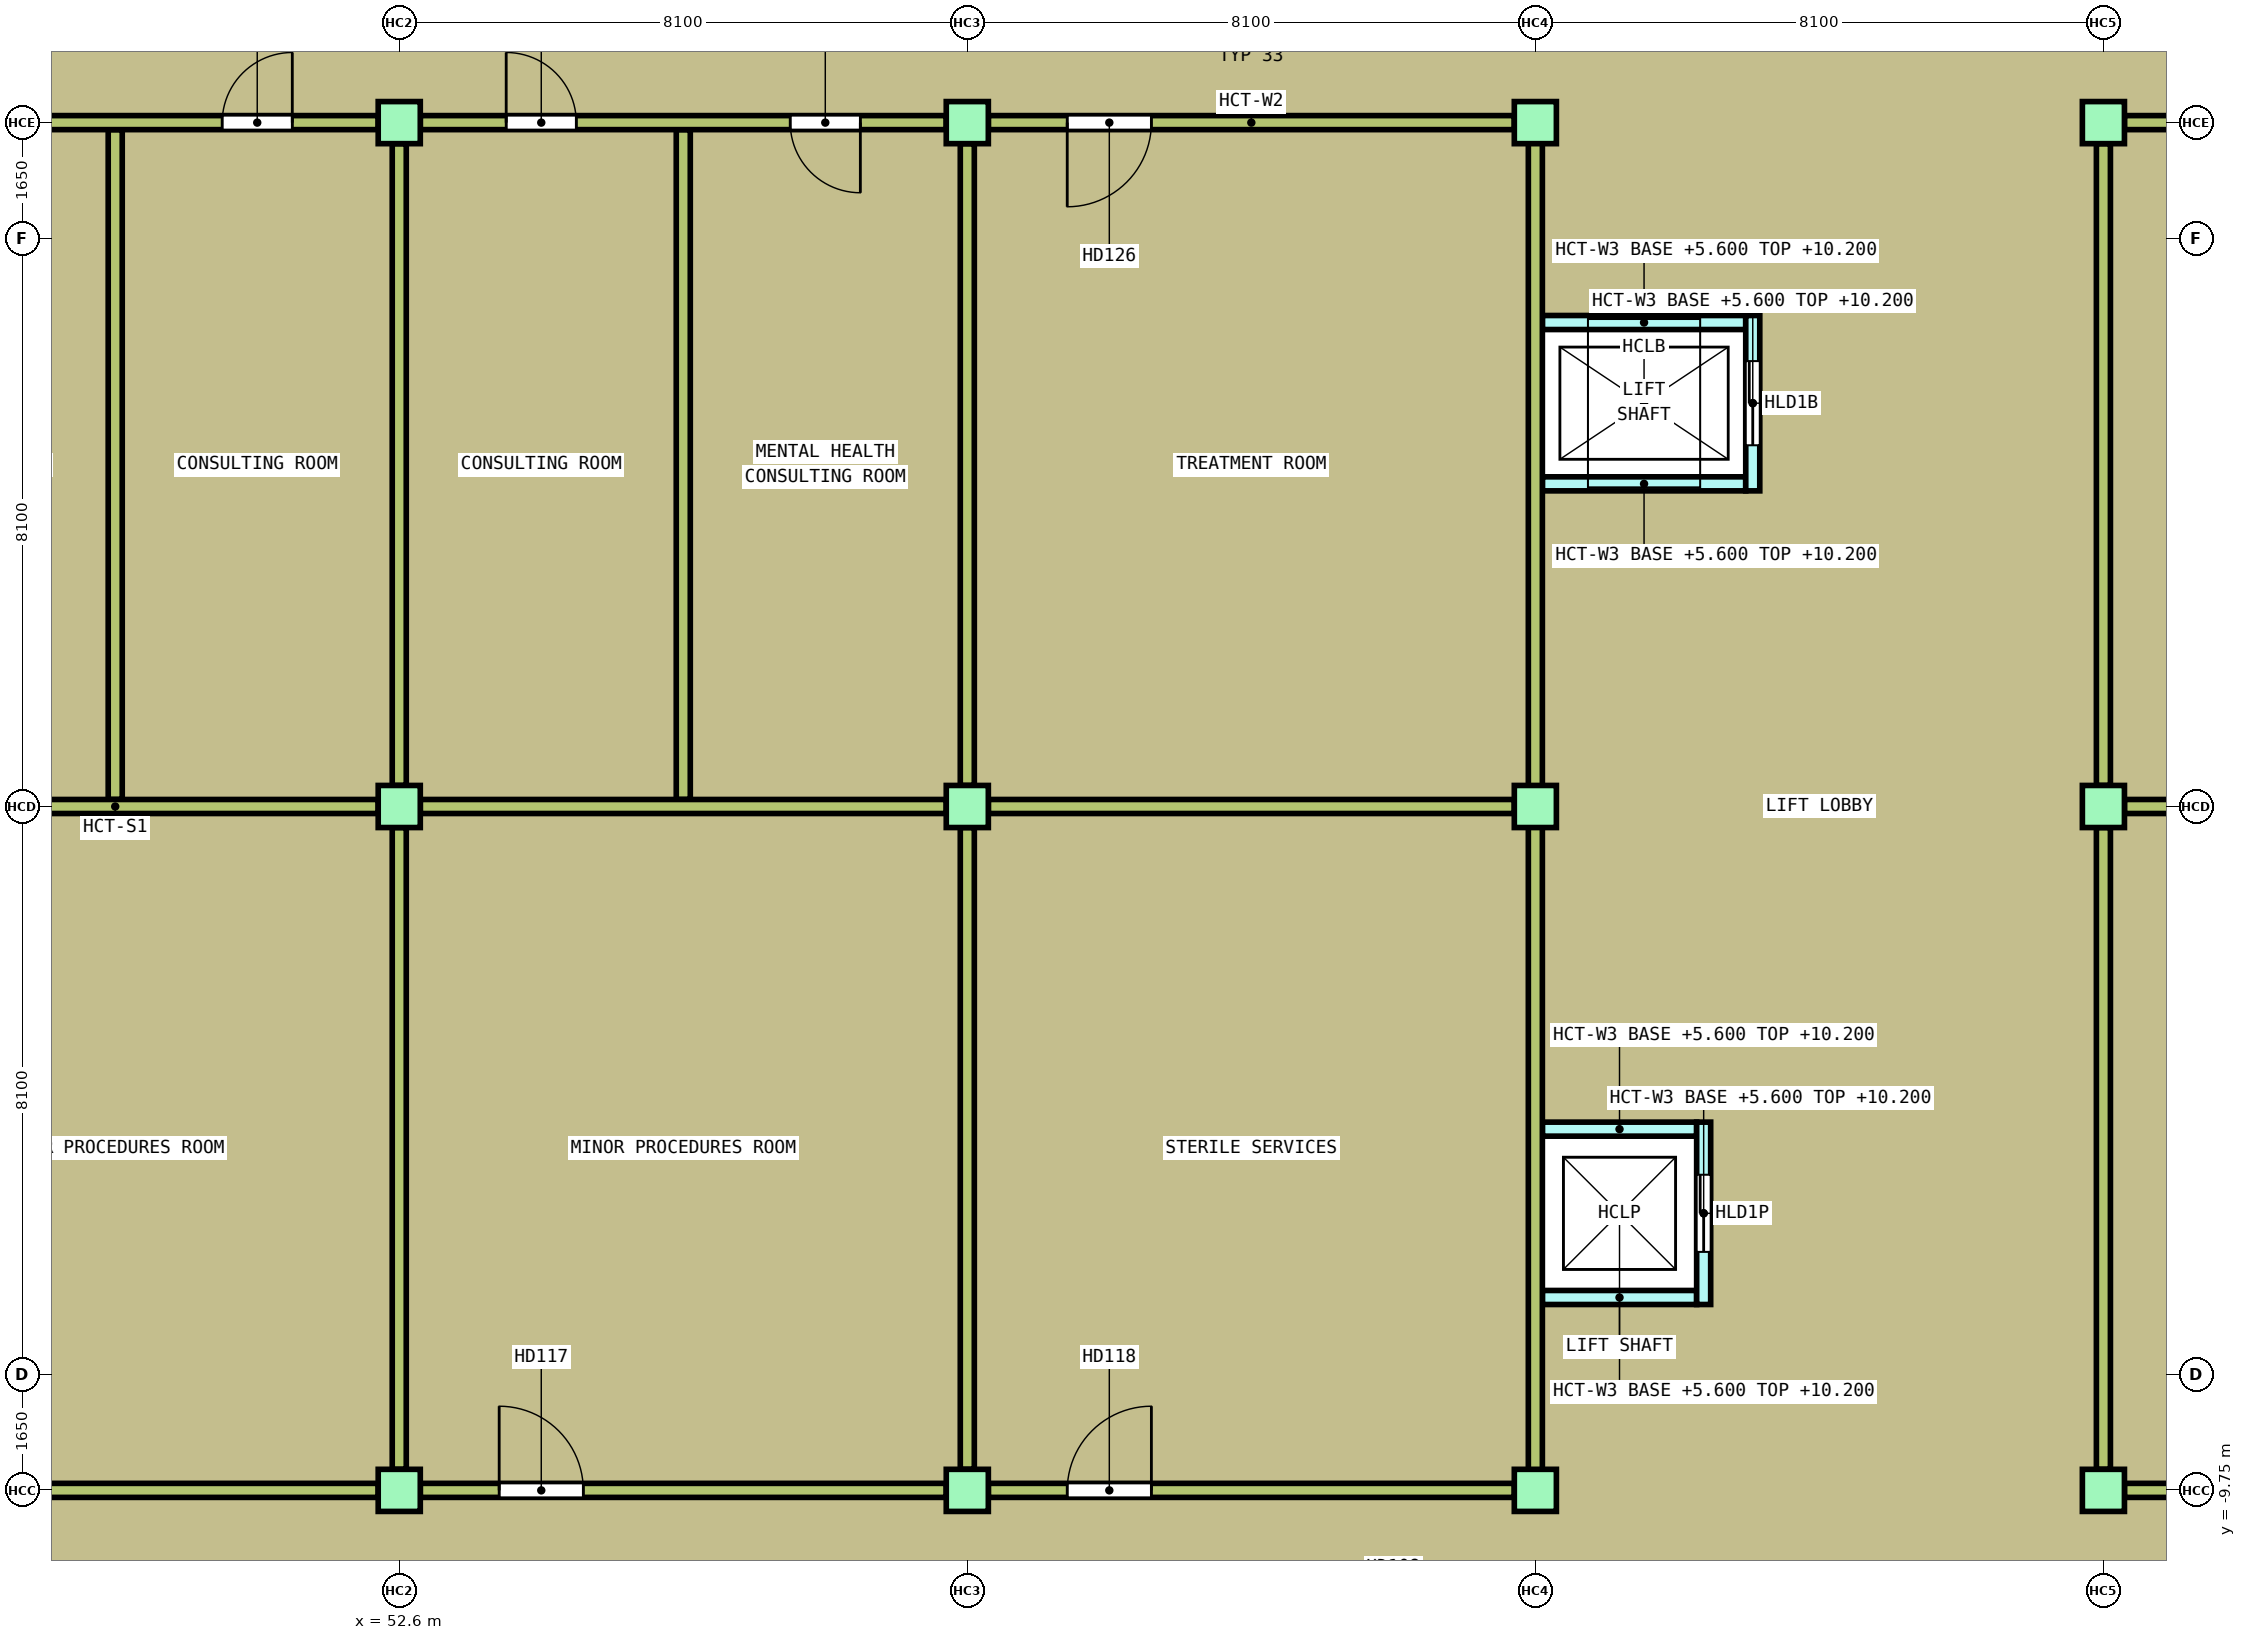
"""IFC4 building model, lengths in metres.
Left out: names, types, materials, properties, quantities, classifications, styles, units other than length and angle.
Written with IfcOpenShell. Run it as: python <this file> out.ifc"""

import sys

from ifc_helpers import new_model, si_unit, direction, frame, frame_2d, origin, origin_2d, place, context, subcontext, project, spatial, rectangle, extrude, element, fill, save


model = new_model("IFC4")
c1 = context("Model", 3, precision=1e-05, world=origin(), true_north=direction((0.0, 1.0)))
c2 = subcontext(c1, "Body", "Model", "MODEL_VIEW")
j1 = project(units=[si_unit("LENGTHUNIT", "METRE"), si_unit("PLANEANGLEUNIT", "RADIAN")], contexts=[c1])
p1 = place(None, origin())
s1 = spatial("IfcSite", under=j1, at=p1, CompositionType="ELEMENT")
p2 = place(p1, origin())
s2 = spatial("IfcBuilding", under=s1, at=p2, CompositionType="ELEMENT")
p3 = place(p2, frame((0.0, 0.0, 5.6)))
s3 = spatial("IfcBuildingStorey", under=s2, at=p3, CompositionType="ELEMENT", Elevation=5.6)
for number, where, z_axis, x_axis in (
    (1, (52.6, -9.75, 0.0), (0.0, 0.0, 1.0), (1.0, 0.0, 0.0)),
    (2, (60.7, -9.75, 0.0), (0.0, 0.0, 1.0), (1.0, 0.0, 0.0)),
    (3, (68.8, -9.75, 0.0), (0.0, 0.0, 1.0), (1.0, 0.0, 0.0)),
    (4, (76.9, -9.75, 0.0), (0.0, 0.0, 1.0), (1.0, 0.0, 0.0)),
    (5, (52.6, 0.0, 0.0), (0.0, 0.0, 1.0), (1.0, 0.0, 0.0)),
    (6, (60.7, 0.0, 0.0), (0.0, 0.0, 1.0), (1.0, 0.0, 0.0)),
    (7, (68.8, 0.0, 0.0), (0.0, 0.0, 1.0), (1.0, 0.0, 0.0)),
    (8, (76.9, 0.0, 0.0), (0.0, 0.0, 1.0), (1.0, 0.0, 0.0)),
    (9, (52.6, 9.75, 0.0), (0.0, 0.0, 1.0), (1.0, 0.0, 0.0)),
    (10, (60.7, 9.75, 0.0), (0.0, 0.0, 1.0), (1.0, 0.0, 0.0)),
    (11, (68.8, 9.75, 0.0), (0.0, 0.0, 1.0), (1.0, 0.0, 0.0)),
    (12, (76.9, 9.75, 0.0), (0.0, 0.0, 1.0), (1.0, 0.0, 0.0)),
):
    element("IfcColumn", number, at=place(p3, frame(where, z_axis=z_axis, x_axis=x_axis)), inside=s3, PredefinedType="COLUMN", context=c2, shape_type="SweptSolid", body=[
        extrude(rectangle(XDim=0.6, YDim=0.6, at=origin_2d()), origin(), (0.0, 0.0, 1.0), 4.6),
    ])
for number, where, z_axis, x_axis in (
    (13, (68.9, -7.0, 0.0), (0.0, 0.0, 1.0), (1.0, 0.0, 0.0)),
    (14, (68.9, -4.6, 0.0), (0.0, 0.0, 1.0), (1.0, 0.0, 0.0)),
):
    element("IfcWall", number, at=place(p3, frame(where, z_axis=z_axis, x_axis=x_axis)), inside=s3, PredefinedType="SOLIDWALL", context=c2, shape_type="SweptSolid", body=[
        extrude(rectangle(XDim=2.2, YDim=0.2, at=frame_2d((1.1, 0.0))), origin(), (0.0, 0.0, 1.0), 4.6),
    ])
p4 = place(p3, frame((71.2, -7.1, 0.0), z_axis=(0.0, 0.0, 1.0), x_axis=(0.0, 1.0, 0.0)))
e15 = element("IfcWall", 15, at=p4, inside=s3, PredefinedType="SOLIDWALL", context=c2, shape_type="SweptSolid", body=[
    extrude(rectangle(XDim=2.6, YDim=0.2, at=frame_2d((1.3, 0.0))), origin(), (0.0, 0.0, 1.0), 4.6),
])
p5 = place(p4, frame((0.75, 0.0, 0.0)))
e16 = element("IfcOpeningElement", 16, at=p5, cuts=e15, PredefinedType="OPENING", context=c2, shape_type="SweptSolid", body=[
    extrude(rectangle(XDim=1.1, YDim=2.1, at=frame_2d((0.55, 1.05))), frame((0.0, 0.11, 0.0), z_axis=(0.0, -1.0, 0.0), x_axis=(1.0, 0.0, 0.0)), (0.0, 0.0, 1.0), 0.22),
])
for number, where, z_axis, x_axis in (
    (17, (68.9, 4.6, 0.0), (0.0, 0.0, 1.0), (1.0, 0.0, 0.0)),
    (18, (68.9, 6.9, 0.0), (0.0, 0.0, 1.0), (1.0, 0.0, 0.0)),
):
    element("IfcWall", number, at=place(p3, frame(where, z_axis=z_axis, x_axis=x_axis)), inside=s3, PredefinedType="SOLIDWALL", context=c2, shape_type="SweptSolid", body=[
        extrude(rectangle(XDim=2.9, YDim=0.2, at=frame_2d((1.45, 0.0))), origin(), (0.0, 0.0, 1.0), 4.6),
    ])
p6 = place(p3, frame((71.9, 4.5, 0.0), z_axis=(0.0, 0.0, 1.0), x_axis=(0.0, 1.0, 0.0)))
e19 = element("IfcWall", 19, at=p6, inside=s3, PredefinedType="SOLIDWALL", context=c2, shape_type="SweptSolid", body=[
    extrude(rectangle(XDim=2.5, YDim=0.2, at=frame_2d((1.25, 0.0))), origin(), (0.0, 0.0, 1.0), 4.6),
])
p7 = place(p6, frame((0.65, 0.0, 0.0)))
e20 = element("IfcOpeningElement", 20, at=p7, cuts=e19, PredefinedType="OPENING", context=c2, shape_type="SweptSolid", body=[
    extrude(rectangle(XDim=1.2, YDim=2.1, at=frame_2d((0.6, 1.05))), frame((0.0, 0.11, 0.0), z_axis=(0.0, -1.0, 0.0), x_axis=(1.0, 0.0, 0.0)), (0.0, 0.0, 1.0), 0.22),
])
p8 = place(p3, frame((48.55, 0.1, 0.0), z_axis=(0.0, 0.0, 1.0), x_axis=(0.0, 1.0, 0.0)))
e21 = element("IfcWall", 21, at=p8, inside=s3, PredefinedType="PARTITIONING", context=c2, shape_type="SweptSolid", body=[
    extrude(rectangle(XDim=9.55, YDim=0.2, at=frame_2d((4.775, 0.0))), origin(), (0.0, 0.0, 1.0), 3.8),
])
for number, where, z_axis, x_axis in (
    (22, (52.6, -9.45, 0.0), (0.0, 0.0, 1.0), (0.0, 1.0, 0.0)),
    (23, (52.6, 0.3, 0.0), (0.0, 0.0, 1.0), (0.0, 1.0, 0.0)),
):
    element("IfcWall", number, at=place(p3, frame(where, z_axis=z_axis, x_axis=x_axis)), inside=s3, PredefinedType="PARTITIONING", context=c2, shape_type="SweptSolid", body=[
        extrude(rectangle(XDim=9.15, YDim=0.2, at=frame_2d((4.575, 0.0))), origin(), (0.0, 0.0, 1.0), 3.8),
    ])
p9 = place(p3, frame((56.65, 0.1, 0.0), z_axis=(0.0, 0.0, 1.0), x_axis=(0.0, 1.0, 0.0)))
e24 = element("IfcWall", 24, at=p9, inside=s3, PredefinedType="PARTITIONING", context=c2, shape_type="SweptSolid", body=[
    extrude(rectangle(XDim=9.55, YDim=0.2, at=frame_2d((4.775, 0.0))), origin(), (0.0, 0.0, 1.0), 3.8),
])
for number, where, z_axis, x_axis in (
    (25, (60.7, -9.45, 0.0), (0.0, 0.0, 1.0), (0.0, 1.0, 0.0)),
    (26, (60.7, 0.3, 0.0), (0.0, 0.0, 1.0), (0.0, 1.0, 0.0)),
    (27, (76.9, -9.45, 0.0), (0.0, 0.0, 1.0), (0.0, 1.0, 0.0)),
    (28, (76.9, 0.3, 0.0), (0.0, 0.0, 1.0), (0.0, 1.0, 0.0)),
):
    element("IfcWall", number, at=place(p3, frame(where, z_axis=z_axis, x_axis=x_axis)), inside=s3, PredefinedType="PARTITIONING", context=c2, shape_type="SweptSolid", body=[
        extrude(rectangle(XDim=9.15, YDim=0.2, at=frame_2d((4.575, 0.0))), origin(), (0.0, 0.0, 1.0), 3.8),
    ])
p10 = place(p3, frame((44.8, -9.75, 0.0), z_axis=(0.0, 0.0, 1.0), x_axis=(1.0, 0.0, 0.0)))
e29 = element("IfcWall", 29, at=p10, inside=s3, PredefinedType="PARTITIONING", context=c2, shape_type="SweptSolid", body=[
    extrude(rectangle(XDim=7.5, YDim=0.2, at=frame_2d((3.75, 0.0))), origin(), (0.0, 0.0, 1.0), 3.8),
])
p11 = place(p10, frame((1.125, 0.0, 0.0)))
e30 = element("IfcOpeningElement", 30, at=p11, cuts=e29, PredefinedType="OPENING", context=c2, shape_type="SweptSolid", body=[
    extrude(rectangle(XDim=1.2, YDim=2.1, at=frame_2d((0.6, 1.05))), frame((0.0, 0.11, 0.0), z_axis=(0.0, -1.0, 0.0), x_axis=(1.0, 0.0, 0.0)), (0.0, 0.0, 1.0), 0.22),
])
p12 = place(p3, frame((52.9, -9.75, 0.0), z_axis=(0.0, 0.0, 1.0), x_axis=(1.0, 0.0, 0.0)))
e31 = element("IfcWall", 31, at=p12, inside=s3, PredefinedType="PARTITIONING", context=c2, shape_type="SweptSolid", body=[
    extrude(rectangle(XDim=7.5, YDim=0.2, at=frame_2d((3.75, 0.0))), origin(), (0.0, 0.0, 1.0), 3.8),
])
p13 = place(p12, frame((1.125, 0.0, 0.0)))
e32 = element("IfcOpeningElement", 32, at=p13, cuts=e31, PredefinedType="OPENING", context=c2, shape_type="SweptSolid", body=[
    extrude(rectangle(XDim=1.2, YDim=2.1, at=frame_2d((0.6, 1.05))), frame((0.0, 0.11, 0.0), z_axis=(0.0, -1.0, 0.0), x_axis=(1.0, 0.0, 0.0)), (0.0, 0.0, 1.0), 0.22),
])
p14 = place(p3, frame((61.0, -9.75, 0.0), z_axis=(0.0, 0.0, 1.0), x_axis=(1.0, 0.0, 0.0)))
e33 = element("IfcWall", 33, at=p14, inside=s3, PredefinedType="PARTITIONING", context=c2, shape_type="SweptSolid", body=[
    extrude(rectangle(XDim=7.5, YDim=0.2, at=frame_2d((3.75, 0.0))), origin(), (0.0, 0.0, 1.0), 3.8),
])
p15 = place(p14, frame((1.125, 0.0, 0.0)))
e34 = element("IfcOpeningElement", 34, at=p15, cuts=e33, PredefinedType="OPENING", context=c2, shape_type="SweptSolid", body=[
    extrude(rectangle(XDim=1.2, YDim=2.1, at=frame_2d((0.6, 1.05))), frame((0.0, 0.11, 0.0), z_axis=(0.0, -1.0, 0.0), x_axis=(1.0, 0.0, 0.0)), (0.0, 0.0, 1.0), 0.22),
])
p16 = place(p3, frame((77.2, -9.75, 0.0), z_axis=(0.0, 0.0, 1.0), x_axis=(1.0, 0.0, 0.0)))
e35 = element("IfcWall", 35, at=p16, inside=s3, PredefinedType="PARTITIONING", context=c2, shape_type="SweptSolid", body=[
    extrude(rectangle(XDim=7.5, YDim=0.2, at=frame_2d((3.75, 0.0))), origin(), (0.0, 0.0, 1.0), 3.8),
])
p17 = place(p16, frame((1.125, 0.0, 0.0)))
e36 = element("IfcOpeningElement", 36, at=p17, cuts=e35, PredefinedType="OPENING", context=c2, shape_type="SweptSolid", body=[
    extrude(rectangle(XDim=1.2, YDim=2.1, at=frame_2d((0.6, 1.05))), frame((0.0, 0.11, 0.0), z_axis=(0.0, -1.0, 0.0), x_axis=(1.0, 0.0, 0.0)), (0.0, 0.0, 1.0), 0.22),
])
for number, where, z_axis, x_axis in (
    (37, (44.8, 0.0, 0.0), (0.0, 0.0, 1.0), (1.0, 0.0, 0.0)),
    (38, (52.9, 0.0, 0.0), (0.0, 0.0, 1.0), (1.0, 0.0, 0.0)),
    (39, (61.0, 0.0, 0.0), (0.0, 0.0, 1.0), (1.0, 0.0, 0.0)),
    (40, (77.2, 0.0, 0.0), (0.0, 0.0, 1.0), (1.0, 0.0, 0.0)),
):
    element("IfcWall", number, at=place(p3, frame(where, z_axis=z_axis, x_axis=x_axis)), inside=s3, PredefinedType="PARTITIONING", context=c2, shape_type="SweptSolid", body=[
        extrude(rectangle(XDim=7.5, YDim=0.2, at=frame_2d((3.75, 0.0))), origin(), (0.0, 0.0, 1.0), 3.8),
    ])
p18 = place(p3, frame((68.8, -9.75, 0.0), z_axis=(0.0, 0.0, 1.0), x_axis=(0.0, 1.0, 0.0)))
e41 = element("IfcWall", 41, at=p18, inside=s3, PredefinedType="PARTITIONING", context=c2, shape_type="SweptSolid", body=[
    extrude(rectangle(XDim=19.5, YDim=0.2, at=frame_2d((9.75, 0.0))), origin(), (0.0, 0.0, 1.0), 3.8),
])
p19 = place(p3, frame((44.8, 9.75, 0.0), z_axis=(0.0, 0.0, 1.0), x_axis=(1.0, 0.0, 0.0)))
e42 = element("IfcWall", 42, at=p19, inside=s3, PredefinedType="PARTITIONING", context=c2, shape_type="SweptSolid", body=[
    extrude(rectangle(XDim=7.5, YDim=0.2, at=frame_2d((3.75, 0.0))), origin(), (0.0, 0.0, 1.0), 3.8),
])
p20 = place(p19, frame((1.225, 0.0, 0.0)))
e43 = element("IfcOpeningElement", 43, at=p20, cuts=e42, PredefinedType="OPENING", context=c2, shape_type="SweptSolid", body=[
    extrude(rectangle(XDim=1.0, YDim=2.1, at=frame_2d((0.5, 1.05))), frame((0.0, 0.11, 0.0), z_axis=(0.0, -1.0, 0.0), x_axis=(1.0, 0.0, 0.0)), (0.0, 0.0, 1.0), 0.22),
])
p21 = place(p19, frame((5.275, 0.0, 0.0)))
e44 = element("IfcOpeningElement", 44, at=p21, cuts=e42, PredefinedType="OPENING", context=c2, shape_type="SweptSolid", body=[
    extrude(rectangle(XDim=1.0, YDim=2.1, at=frame_2d((0.5, 1.05))), frame((0.0, 0.11, 0.0), z_axis=(0.0, -1.0, 0.0), x_axis=(1.0, 0.0, 0.0)), (0.0, 0.0, 1.0), 0.22),
])
p22 = place(p3, frame((52.9, 9.75, 0.0), z_axis=(0.0, 0.0, 1.0), x_axis=(1.0, 0.0, 0.0)))
e45 = element("IfcWall", 45, at=p22, inside=s3, PredefinedType="PARTITIONING", context=c2, shape_type="SweptSolid", body=[
    extrude(rectangle(XDim=7.5, YDim=0.2, at=frame_2d((3.75, 0.0))), origin(), (0.0, 0.0, 1.0), 3.8),
])
p23 = place(p22, frame((1.225, 0.0, 0.0)))
e46 = element("IfcOpeningElement", 46, at=p23, cuts=e45, PredefinedType="OPENING", context=c2, shape_type="SweptSolid", body=[
    extrude(rectangle(XDim=1.0, YDim=2.1, at=frame_2d((0.5, 1.05))), frame((0.0, 0.11, 0.0), z_axis=(0.0, -1.0, 0.0), x_axis=(1.0, 0.0, 0.0)), (0.0, 0.0, 1.0), 0.22),
])
p24 = place(p22, frame((5.275, 0.0, 0.0)))
e47 = element("IfcOpeningElement", 47, at=p24, cuts=e45, PredefinedType="OPENING", context=c2, shape_type="SweptSolid", body=[
    extrude(rectangle(XDim=1.0, YDim=2.1, at=frame_2d((0.5, 1.05))), frame((0.0, 0.11, 0.0), z_axis=(0.0, -1.0, 0.0), x_axis=(1.0, 0.0, 0.0)), (0.0, 0.0, 1.0), 0.22),
])
p25 = place(p3, frame((61.0, 9.75, 0.0), z_axis=(0.0, 0.0, 1.0), x_axis=(1.0, 0.0, 0.0)))
e48 = element("IfcWall", 48, at=p25, inside=s3, PredefinedType="PARTITIONING", context=c2, shape_type="SweptSolid", body=[
    extrude(rectangle(XDim=7.5, YDim=0.2, at=frame_2d((3.75, 0.0))), origin(), (0.0, 0.0, 1.0), 3.8),
])
p26 = place(p25, frame((1.125, 0.0, 0.0)))
e49 = element("IfcOpeningElement", 49, at=p26, cuts=e48, PredefinedType="OPENING", context=c2, shape_type="SweptSolid", body=[
    extrude(rectangle(XDim=1.2, YDim=2.1, at=frame_2d((0.6, 1.05))), frame((0.0, 0.11, 0.0), z_axis=(0.0, -1.0, 0.0), x_axis=(1.0, 0.0, 0.0)), (0.0, 0.0, 1.0), 0.22),
])
p27 = place(p3, frame((77.2, 9.75, 0.0), z_axis=(0.0, 0.0, 1.0), x_axis=(1.0, 0.0, 0.0)))
e50 = element("IfcWall", 50, at=p27, inside=s3, PredefinedType="PARTITIONING", context=c2, shape_type="SweptSolid", body=[
    extrude(rectangle(XDim=7.5, YDim=0.2, at=frame_2d((3.75, 0.0))), origin(), (0.0, 0.0, 1.0), 3.8),
])
p28 = place(p27, frame((1.225, 0.0, 0.0)))
e51 = element("IfcOpeningElement", 51, at=p28, cuts=e50, PredefinedType="OPENING", context=c2, shape_type="SweptSolid", body=[
    extrude(rectangle(XDim=1.0, YDim=2.1, at=frame_2d((0.5, 1.05))), frame((0.0, 0.11, 0.0), z_axis=(0.0, -1.0, 0.0), x_axis=(1.0, 0.0, 0.0)), (0.0, 0.0, 1.0), 0.22),
])
p29 = place(p5, origin())
e52 = element("IfcDoor", 52, at=p29, inside=s3, OperationType="SLIDING_TO_LEFT", PredefinedType="DOOR", context=c2, shape_type="SweptSolid", body=[
    extrude(rectangle(XDim=1.1, YDim=2.1, at=frame_2d((0.55, 1.05))), frame((0.0, 0.025, 0.0), z_axis=(0.0, -1.0, 0.0), x_axis=(1.0, 0.0, 0.0)), (0.0, 0.0, 1.0), 0.05),
])
fill(e16, e52)
p30 = place(p7, origin())
e53 = element("IfcDoor", 53, at=p30, inside=s3, OperationType="SLIDING_TO_LEFT", PredefinedType="DOOR", context=c2, shape_type="SweptSolid", body=[
    extrude(rectangle(XDim=1.2, YDim=2.1, at=frame_2d((0.6, 1.05))), frame((0.0, 0.025, 0.0), z_axis=(0.0, -1.0, 0.0), x_axis=(1.0, 0.0, 0.0)), (0.0, 0.0, 1.0), 0.05),
])
fill(e20, e53)
p31 = place(p13, origin())
e54 = element("IfcDoor", 54, at=p31, inside=s3, OperationType="SINGLE_SWING_RIGHT", PredefinedType="DOOR", context=c2, shape_type="SweptSolid", body=[
    extrude(rectangle(XDim=1.2, YDim=2.1, at=frame_2d((0.6, 1.05))), frame((0.0, 0.025, 0.0), z_axis=(0.0, -1.0, 0.0), x_axis=(1.0, 0.0, 0.0)), (0.0, 0.0, 1.0), 0.05),
])
fill(e32, e54)
p32 = place(p15, origin())
e55 = element("IfcDoor", 55, at=p32, inside=s3, OperationType="SINGLE_SWING_LEFT", PredefinedType="DOOR", context=c2, shape_type="SweptSolid", body=[
    extrude(rectangle(XDim=1.2, YDim=2.1, at=frame_2d((0.6, 1.05))), frame((0.0, 0.025, 0.0), z_axis=(0.0, -1.0, 0.0), x_axis=(1.0, 0.0, 0.0)), (0.0, 0.0, 1.0), 0.05),
])
fill(e34, e55)
p33 = place(p21, origin())
e56 = element("IfcDoor", 56, at=p33, inside=s3, OperationType="SINGLE_SWING_RIGHT", PredefinedType="DOOR", context=c2, shape_type="SweptSolid", body=[
    extrude(rectangle(XDim=1.0, YDim=2.1, at=frame_2d((0.5, 1.05))), frame((0.0, 0.025, 0.0), z_axis=(0.0, -1.0, 0.0), x_axis=(1.0, 0.0, 0.0)), (0.0, 0.0, 1.0), 0.05),
])
fill(e44, e56)
p34 = place(p23, origin())
e57 = element("IfcDoor", 57, at=p34, inside=s3, OperationType="SINGLE_SWING_LEFT", PredefinedType="DOOR", context=c2, shape_type="SweptSolid", body=[
    extrude(rectangle(XDim=1.0, YDim=2.1, at=frame_2d((0.5, 1.05))), frame((0.0, 0.025, 0.0), z_axis=(0.0, -1.0, 0.0), x_axis=(1.0, 0.0, 0.0)), (0.0, 0.0, 1.0), 0.05),
])
fill(e46, e57)
p35 = place(p24, origin())
e58 = element("IfcDoor", 58, at=p35, inside=s3, OperationType="SINGLE_SWING_RIGHT", PredefinedType="DOOR", context=c2, shape_type="SweptSolid", body=[
    extrude(rectangle(XDim=1.0, YDim=2.1, at=frame_2d((0.5, 1.05))), frame((0.0, 0.025, 0.0), z_axis=(0.0, -1.0, 0.0), x_axis=(1.0, 0.0, 0.0)), (0.0, 0.0, 1.0), 0.05),
])
fill(e47, e58)
p36 = place(p26, origin())
e59 = element("IfcDoor", 59, at=p36, inside=s3, OperationType="SINGLE_SWING_LEFT", PredefinedType="DOOR", context=c2, shape_type="SweptSolid", body=[
    extrude(rectangle(XDim=1.2, YDim=2.1, at=frame_2d((0.6, 1.05))), frame((0.0, 0.025, 0.0), z_axis=(0.0, -1.0, 0.0), x_axis=(1.0, 0.0, 0.0)), (0.0, 0.0, 1.0), 0.05),
])
fill(e49, e59)
save(model, sys.argv[1])
